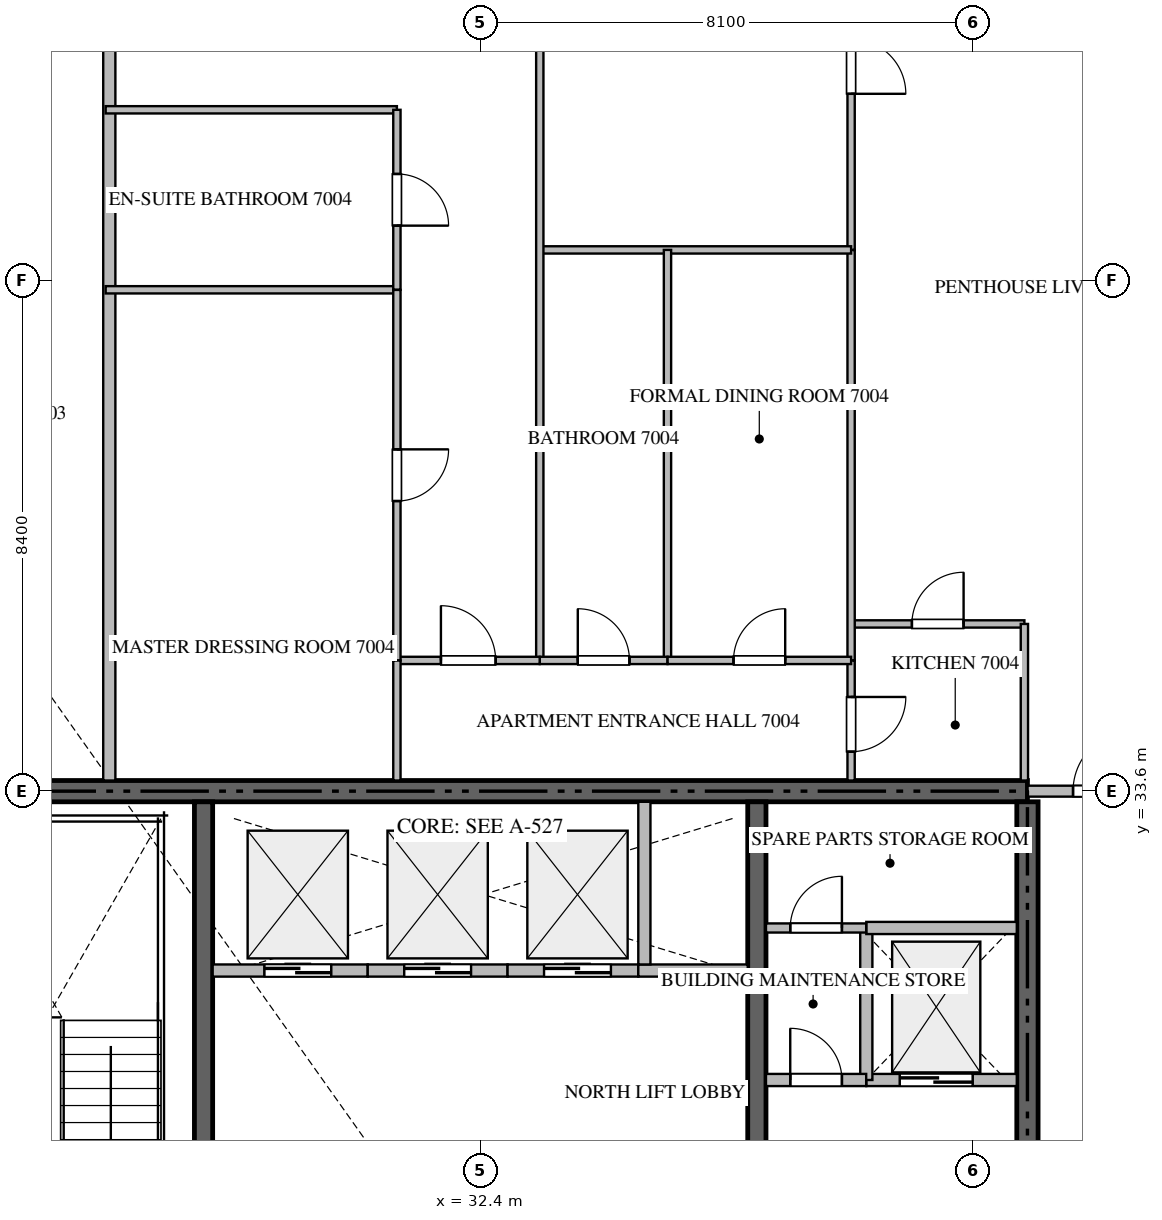
"""IFC4 building model, lengths in metres.
Left out: names, types, materials, properties, quantities, classifications, styles, units other than length and angle.
Written with IfcOpenShell. Run it as: python <this file> out.ifc"""

import sys

from ifc_helpers import new_model, si_unit, direction, frame, frame_2d, origin, place, context, subcontext, project, spatial, rectangle, extrude, source, transform, mapped, element, fill, save


model = new_model("IFC4")
c1 = context("Model", 3, precision=1e-05, world=origin(), true_north=direction((0.0, 1.0)))
c2 = subcontext(c1, "Body", "Model", "MODEL_VIEW")
j1 = project(units=[si_unit("LENGTHUNIT", "METRE"), si_unit("PLANEANGLEUNIT", "RADIAN")], contexts=[c1])
p1 = place(None, origin())
s1 = spatial("IfcSite", under=j1, at=p1, CompositionType="ELEMENT")
p2 = place(p1, origin())
s2 = spatial("IfcBuilding", under=s1, at=p2, CompositionType="ELEMENT")
p3 = place(p2, frame((0.0, 0.0, 279.75)))
s3 = spatial("IfcBuildingStorey", under=s2, at=p3, CompositionType="ELEMENT", Elevation=279.75)
p4 = place(p3, frame((41.4, 33.6, -0.26), z_axis=(0.0, 0.0, 1.0), x_axis=(-1.0, 0.0, 0.0)))
e1 = element("IfcWall", 1, at=p4, inside=s3, PredefinedType="SHEAR", context=c2, shape_type="SweptSolid", body=[
    extrude(rectangle(XDim=18.0, YDim=0.35, at=frame_2d((9.0, 0.0))), origin(), (0.0, 0.0, 1.0), 3.848),
])
p5 = place(p3, frame((41.4, 27.75, -0.26), z_axis=(0.0, 0.0, 1.0), x_axis=(0.0, 1.0, 0.0)))
e2 = element("IfcWall", 2, at=p5, inside=s3, PredefinedType="SHEAR", context=c2, shape_type="SweptSolid", body=[
    extrude(rectangle(XDim=5.675, YDim=0.35, at=frame_2d((2.837, 0.0))), origin(), (0.0, 0.0, 1.0), 3.848),
])
p6 = place(p3, frame((27.85, 23.55, -0.26), z_axis=(0.0, 0.0, 1.0), x_axis=(0.0, 1.0, 0.0)))
e3 = element("IfcWall", 3, at=p6, inside=s3, PredefinedType="SHEAR", context=c2, shape_type="SweptSolid", body=[
    extrude(rectangle(XDim=9.875, YDim=0.3, at=frame_2d((4.938, 0.0))), origin(), (0.0, 0.0, 1.0), 3.848),
])
p7 = place(p3, frame((36.95, 27.05, -0.26), z_axis=(0.0, 0.0, 1.0), x_axis=(0.0, 1.0, 0.0)))
e4 = element("IfcWall", 4, at=p7, inside=s3, PredefinedType="SHEAR", context=c2, shape_type="SweptSolid", body=[
    extrude(rectangle(XDim=6.375, YDim=0.3, at=frame_2d((3.188, 0.0))), origin(), (0.0, 0.0, 1.0), 3.848),
])
p8 = place(p3, frame((38.75, 28.85, 0.0), z_axis=(0.0, 0.0, 1.0), x_axis=(1.0, 0.0, 0.0)))
e5 = element("IfcWall", 5, at=p8, inside=s3, PredefinedType="STANDARD", context=c2, shape_type="SweptSolid", body=[
    extrude(rectangle(XDim=2.475, YDim=0.2, at=frame_2d((1.238, 0.0))), origin(), (0.0, 0.0, 1.0), 3.59),
])
p9 = place(p8, frame((0.55, 0.0, 0.0)))
e6 = element("IfcOpeningElement", 6, at=p9, cuts=e5, PredefinedType="OPENING", context=c2, shape_type="SweptSolid", body=[
    extrude(rectangle(XDim=1.2, YDim=2.2, at=frame_2d((0.6, 1.1))), frame((0.0, 0.11, 0.0), z_axis=(0.0, -1.0, 0.0), x_axis=(1.0, 0.0, 0.0)), (0.0, 0.0, 1.0), 0.22),
])
p10 = place(p3, frame((28.0, 30.65, 0.0), z_axis=(0.0, 0.0, 1.0), x_axis=(1.0, 0.0, 0.0)))
e7 = element("IfcWall", 7, at=p10, inside=s3, PredefinedType="STANDARD", context=c2, shape_type="SweptSolid", body=[
    extrude(rectangle(XDim=2.55, YDim=0.2, at=frame_2d((1.275, 0.0))), origin(), (0.0, 0.0, 1.0), 3.59),
])
p11 = place(p10, frame((0.85, 0.0, 0.0)))
e8 = element("IfcOpeningElement", 8, at=p11, cuts=e7, PredefinedType="OPENING", context=c2, shape_type="SweptSolid", body=[
    extrude(rectangle(XDim=1.1, YDim=2.2, at=frame_2d((0.55, 1.1))), frame((0.0, 0.11, 0.0), z_axis=(0.0, -1.0, 0.0), x_axis=(1.0, 0.0, 0.0)), (0.0, 0.0, 1.0), 0.22),
])
p12 = place(p3, frame((30.55, 30.65, 0.0), z_axis=(0.0, 0.0, 1.0), x_axis=(1.0, 0.0, 0.0)))
e9 = element("IfcWall", 9, at=p12, inside=s3, PredefinedType="STANDARD", context=c2, shape_type="SweptSolid", body=[
    extrude(rectangle(XDim=2.3, YDim=0.2, at=frame_2d((1.15, 0.0))), origin(), (0.0, 0.0, 1.0), 3.59),
])
p13 = place(p12, frame((0.6, 0.0, 0.0)))
e10 = element("IfcOpeningElement", 10, at=p13, cuts=e9, PredefinedType="OPENING", context=c2, shape_type="SweptSolid", body=[
    extrude(rectangle(XDim=1.1, YDim=2.2, at=frame_2d((0.55, 1.1))), frame((0.0, 0.11, 0.0), z_axis=(0.0, -1.0, 0.0), x_axis=(1.0, 0.0, 0.0)), (0.0, 0.0, 1.0), 0.22),
])
p14 = place(p3, frame((32.85, 30.65, 0.0), z_axis=(0.0, 0.0, 1.0), x_axis=(1.0, 0.0, 0.0)))
e11 = element("IfcWall", 11, at=p14, inside=s3, PredefinedType="STANDARD", context=c2, shape_type="SweptSolid", body=[
    extrude(rectangle(XDim=2.15, YDim=0.2, at=frame_2d((1.075, 0.0))), origin(), (0.0, 0.0, 1.0), 3.59),
])
p15 = place(p14, frame((0.6, 0.0, 0.0)))
e12 = element("IfcOpeningElement", 12, at=p15, cuts=e11, PredefinedType="OPENING", context=c2, shape_type="SweptSolid", body=[
    extrude(rectangle(XDim=1.1, YDim=2.2, at=frame_2d((0.55, 1.1))), frame((0.0, 0.11, 0.0), z_axis=(0.0, -1.0, 0.0), x_axis=(1.0, 0.0, 0.0)), (0.0, 0.0, 1.0), 0.22),
])
p16 = place(p3, frame((35.0, 30.65, 0.0), z_axis=(0.0, 0.0, 1.0), x_axis=(1.0, 0.0, 0.0)))
e13 = element("IfcWall", 13, at=p16, inside=s3, PredefinedType="STANDARD", context=c2, shape_type="SweptSolid", body=[
    extrude(rectangle(XDim=1.8, YDim=0.2, at=frame_2d((0.9, 0.0))), origin(), (0.0, 0.0, 1.0), 3.59),
])
p17 = place(p3, frame((35.1, 30.75, 0.0), z_axis=(0.0, 0.0, 1.0), x_axis=(0.0, 1.0, 0.0)))
e14 = element("IfcWall", 14, at=p17, inside=s3, PredefinedType="STANDARD", context=c2, shape_type="SweptSolid", body=[
    extrude(rectangle(XDim=2.675, YDim=0.2, at=frame_2d((1.337, 0.0))), origin(), (0.0, 0.0, 1.0), 3.59),
])
p18 = place(p3, frame((38.75, 28.85, 0.0), z_axis=(0.0, 0.0, 1.0), x_axis=(0.0, 1.0, 0.0)))
e15 = element("IfcWall", 15, at=p18, inside=s3, PredefinedType="STANDARD", context=c2, shape_type="SweptSolid", body=[
    extrude(rectangle(XDim=2.5, YDim=0.2, at=frame_2d((1.25, 0.0))), origin(), (0.0, 0.0, 1.0), 3.59),
])
p19 = place(p3, frame((38.75, 31.35, 0.0), z_axis=(0.0, 0.0, 1.0), x_axis=(1.0, 0.0, 0.0)))
e16 = element("IfcWall", 16, at=p19, inside=s3, PredefinedType="STANDARD", context=c2, shape_type="SweptSolid", body=[
    extrude(rectangle(XDim=2.475, YDim=0.2, at=frame_2d((1.238, 0.0))), origin(), (0.0, 0.0, 1.0), 3.59),
])
p20 = place(p3, frame((37.1, 28.85, 0.0), z_axis=(0.0, 0.0, 1.0), x_axis=(1.0, 0.0, 0.0)))
e17 = element("IfcWall", 17, at=p20, inside=s3, PredefinedType="STANDARD", context=c2, shape_type="SweptSolid", body=[
    extrude(rectangle(XDim=1.648, YDim=0.2, at=frame_2d((0.824, 0.0))), origin(), (0.0, 0.0, 1.0), 3.59),
])
p21 = place(p20, frame((0.399, 0.0, 0.0)))
e18 = element("IfcOpeningElement", 18, at=p21, cuts=e17, PredefinedType="OPENING", context=c2, shape_type="SweptSolid", body=[
    extrude(rectangle(XDim=0.85, YDim=2.1, at=frame_2d((0.425, 1.05))), frame((0.0, 0.11, 0.0), z_axis=(0.0, -1.0, 0.0), x_axis=(1.0, 0.0, 0.0)), (0.0, 0.0, 1.0), 0.22),
])
p22 = place(p3, frame((37.1, 31.35, 0.0), z_axis=(0.0, 0.0, 1.0), x_axis=(1.0, 0.0, 0.0)))
e19 = element("IfcWall", 19, at=p22, inside=s3, PredefinedType="PARTITIONING", context=c2, shape_type="SweptSolid", body=[
    extrude(rectangle(XDim=1.648, YDim=0.15, at=frame_2d((0.824, 0.0))), origin(), (0.0, 0.0, 1.0), 3.59),
])
p23 = place(p22, frame((0.399, 0.0, 0.0)))
e20 = element("IfcOpeningElement", 20, at=p23, cuts=e19, PredefinedType="OPENING", context=c2, shape_type="SweptSolid", body=[
    extrude(rectangle(XDim=0.85, YDim=2.1, at=frame_2d((0.425, 1.05))), frame((0.0, 0.085, 0.0), z_axis=(0.0, -1.0, 0.0), x_axis=(1.0, 0.0, 0.0)), (0.0, 0.0, 1.0), 0.17),
])
p24 = place(p3, frame((26.3, 33.775, 0.0), z_axis=(0.0, 0.0, 1.0), x_axis=(0.0, 1.0, 0.0)))
e21 = element("IfcWall", 21, at=p24, inside=s3, PredefinedType="PARTITIONING", context=c2, shape_type="SweptSolid", body=[
    extrude(rectangle(XDim=15.343, YDim=0.2, at=frame_2d((7.671, 0.0))), origin(), (0.0, 0.0, 1.0), 3.59),
])
p25 = place(p3, frame((41.402, 33.6, 0.0), z_axis=(0.0, 0.0, 1.0), x_axis=(1.0, 0.0, 0.0)))
e22 = element("IfcWall", 22, at=p25, inside=s3, PredefinedType="PARTITIONING", context=c2, shape_type="SweptSolid", body=[
    extrude(rectangle(XDim=2.496, YDim=0.18, at=frame_2d((1.248, 0.0))), origin(), (0.0, 0.0, 1.0), 3.59),
])
p26 = place(p25, frame((0.748, 0.0, 0.0)))
e23 = element("IfcOpeningElement", 23, at=p26, cuts=e22, PredefinedType="OPENING", context=c2, shape_type="SweptSolid", body=[
    extrude(rectangle(XDim=1.0, YDim=2.15, at=frame_2d((0.5, 1.075))), frame((0.0, 0.1, 0.0), z_axis=(0.0, -1.0, 0.0), x_axis=(1.0, 0.0, 0.0)), (0.0, 0.0, 1.0), 0.2),
])
p27 = place(p3, frame((38.5, 36.35, 0.0), z_axis=(0.0, 0.0, 1.0), x_axis=(1.0, 0.0, 0.0)))
e24 = element("IfcWall", 24, at=p27, inside=s3, PredefinedType="PARTITIONING", context=c2, shape_type="SweptSolid", body=[
    extrude(rectangle(XDim=2.85, YDim=0.12, at=frame_2d((1.425, 0.0))), origin(), (0.0, 0.0, 1.0), 3.59),
])
p28 = place(p27, frame((1.0, 0.0, 0.0)))
e25 = element("IfcOpeningElement", 25, at=p28, cuts=e24, PredefinedType="OPENING", context=c2, shape_type="SweptSolid", body=[
    extrude(rectangle(XDim=0.85, YDim=2.1, at=frame_2d((0.425, 1.05))), frame((0.0, 0.07, 0.0), z_axis=(0.0, -1.0, 0.0), x_axis=(1.0, 0.0, 0.0)), (0.0, 0.0, 1.0), 0.14),
])
p29 = place(p3, frame((41.35, 36.35, 0.0), z_axis=(0.0, 0.0, 1.0), x_axis=(0.0, -1.0, 0.0)))
e26 = element("IfcWall", 26, at=p29, inside=s3, PredefinedType="PARTITIONING", context=c2, shape_type="SweptSolid", body=[
    extrude(rectangle(XDim=2.575, YDim=0.12, at=frame_2d((1.288, 0.0))), origin(), (0.0, 0.0, 1.0), 3.59),
])
p30 = place(p3, frame((38.5, 35.75, 0.0), z_axis=(0.0, 0.0, 1.0), x_axis=(0.0, -1.0, 0.0)))
e27 = element("IfcWall", 27, at=p30, inside=s3, PredefinedType="PARTITIONING", context=c2, shape_type="SweptSolid", body=[
    extrude(rectangle(XDim=1.975, YDim=0.12, at=frame_2d((0.988, 0.0))), origin(), (0.0, 0.0, 1.0), 3.59),
])
p31 = place(p30, frame((0.601, 0.0, 0.0)))
e28 = element("IfcOpeningElement", 28, at=p31, cuts=e27, PredefinedType="OPENING", context=c2, shape_type="SweptSolid", body=[
    extrude(rectangle(XDim=0.9, YDim=2.1, at=frame_2d((0.45, 1.05))), frame((0.0, 0.07, 0.0), z_axis=(0.0, -1.0, 0.0), x_axis=(1.0, 0.0, 0.0)), (0.0, 0.0, 1.0), 0.14),
])
p32 = place(p3, frame((38.5, 49.105, 0.0), z_axis=(0.0, 0.0, 1.0), x_axis=(0.0, -1.0, 0.0)))
e29 = element("IfcWall", 29, at=p32, inside=s3, PredefinedType="PARTITIONING", context=c2, shape_type="SweptSolid", body=[
    extrude(rectangle(XDim=6.604, YDim=0.12, at=frame_2d((3.302, 0.0))), origin(), (0.0, 0.0, 1.0), 3.59),
])
p33 = place(p32, frame((3.137, 0.0, 0.0)))
e30 = element("IfcOpeningElement", 30, at=p33, cuts=e29, PredefinedType="OPENING", context=c2, shape_type="SweptSolid", body=[
    extrude(rectangle(XDim=0.9, YDim=2.1, at=frame_2d((0.45, 1.05))), frame((0.0, 0.07, 0.0), z_axis=(0.0, -1.0, 0.0), x_axis=(1.0, 0.0, 0.0)), (0.0, 0.0, 1.0), 0.14),
])
p34 = place(p3, frame((38.5, 42.499, 0.0), z_axis=(0.0, 0.0, 1.0), x_axis=(0.0, -1.0, 0.0)))
e31 = element("IfcWall", 31, at=p34, inside=s3, PredefinedType="PARTITIONING", context=c2, shape_type="SweptSolid", body=[
    extrude(rectangle(XDim=6.747, YDim=0.12, at=frame_2d((3.374, 0.0))), origin(), (0.0, 0.0, 1.0), 3.59),
])
p35 = place(p3, frame((33.38, 42.501, 0.0), z_axis=(0.0, 0.0, 1.0), x_axis=(1.0, 0.0, 0.0)))
e32 = element("IfcWall", 32, at=p35, inside=s3, PredefinedType="PARTITIONING", context=c2, shape_type="SweptSolid", body=[
    extrude(rectangle(XDim=5.12, YDim=0.12, at=frame_2d((2.56, 0.0))), origin(), (0.0, 0.0, 1.0), 3.59),
])
p36 = place(p3, frame((33.38, 49.105, 0.0), z_axis=(0.0, 0.0, 1.0), x_axis=(0.0, -1.0, 0.0)))
e33 = element("IfcWall", 33, at=p36, inside=s3, PredefinedType="PARTITIONING", context=c2, shape_type="SweptSolid", body=[
    extrude(rectangle(XDim=13.355, YDim=0.12, at=frame_2d((6.677, 0.0))), origin(), (0.0, 0.0, 1.0), 3.59),
])
p37 = place(p3, frame((35.48, 42.501, 0.0), z_axis=(0.0, 0.0, 1.0), x_axis=(0.0, -1.0, 0.0)))
e34 = element("IfcWall", 34, at=p37, inside=s3, PredefinedType="PARTITIONING", context=c2, shape_type="SweptSolid", body=[
    extrude(rectangle(XDim=6.751, YDim=0.12, at=frame_2d((3.375, 0.0))), origin(), (0.0, 0.0, 1.0), 3.59),
])
p38 = place(p3, frame((33.38, 35.75, 0.0), z_axis=(0.0, 0.0, 1.0), x_axis=(1.0, 0.0, 0.0)))
e35 = element("IfcWall", 35, at=p38, inside=s3, PredefinedType="PARTITIONING", context=c2, shape_type="SweptSolid", body=[
    extrude(rectangle(XDim=2.1, YDim=0.12, at=frame_2d((1.05, 0.0))), origin(), (0.0, 0.0, 1.0), 3.59),
])
p39 = place(p38, frame((0.625, 0.0, 0.0)))
e36 = element("IfcOpeningElement", 36, at=p39, cuts=e35, PredefinedType="OPENING", context=c2, shape_type="SweptSolid", body=[
    extrude(rectangle(XDim=0.85, YDim=2.1, at=frame_2d((0.425, 1.05))), frame((0.0, 0.07, 0.0), z_axis=(0.0, -1.0, 0.0), x_axis=(1.0, 0.0, 0.0)), (0.0, 0.0, 1.0), 0.14),
])
p40 = place(p3, frame((35.482, 35.75, 0.0), z_axis=(0.0, 0.0, 1.0), x_axis=(1.0, 0.0, 0.0)))
e37 = element("IfcWall", 37, at=p40, inside=s3, PredefinedType="PARTITIONING", context=c2, shape_type="SweptSolid", body=[
    extrude(rectangle(XDim=3.018, YDim=0.12, at=frame_2d((1.509, 0.0))), origin(), (0.0, 0.0, 1.0), 3.59),
])
p41 = place(p40, frame((1.084, 0.0, 0.0)))
e38 = element("IfcOpeningElement", 38, at=p41, cuts=e37, PredefinedType="OPENING", context=c2, shape_type="SweptSolid", body=[
    extrude(rectangle(XDim=0.85, YDim=2.1, at=frame_2d((0.425, 1.05))), frame((0.0, 0.07, 0.0), z_axis=(0.0, -1.0, 0.0), x_axis=(1.0, 0.0, 0.0)), (0.0, 0.0, 1.0), 0.14),
])
p42 = place(p3, frame((31.03, 35.75, 0.0), z_axis=(0.0, 0.0, 1.0), x_axis=(1.0, 0.0, 0.0)))
e39 = element("IfcWall", 39, at=p42, inside=s3, PredefinedType="PARTITIONING", context=c2, shape_type="SweptSolid", body=[
    extrude(rectangle(XDim=2.348, YDim=0.12, at=frame_2d((1.174, 0.0))), origin(), (0.0, 0.0, 1.0), 3.59),
])
p43 = place(p42, frame((0.724, 0.0, 0.0)))
e40 = element("IfcOpeningElement", 40, at=p43, cuts=e39, PredefinedType="OPENING", context=c2, shape_type="SweptSolid", body=[
    extrude(rectangle(XDim=0.9, YDim=2.1, at=frame_2d((0.45, 1.05))), frame((0.0, 0.07, 0.0), z_axis=(0.0, -1.0, 0.0), x_axis=(1.0, 0.0, 0.0)), (0.0, 0.0, 1.0), 0.14),
])
for number, where, z_axis, x_axis in (
    (41, (26.24, 44.805, 0.0), (0.0, 0.0, 1.0), (1.0, 0.0, 0.0)),
    (42, (26.24, 41.845, 0.0), (0.0, 0.0, 1.0), (1.0, 0.0, 0.0)),
):
    element("IfcWall", number, at=place(p3, frame(where, z_axis=z_axis, x_axis=x_axis)), inside=s3, PredefinedType="PARTITIONING", context=c2, shape_type="SweptSolid", body=[
        extrude(rectangle(XDim=4.79, YDim=0.12, at=frame_2d((2.395, 0.0))), origin(), (0.0, 0.0, 1.0), 3.59),
    ])
p44 = place(p3, frame((31.03, 44.805, 0.0), z_axis=(0.0, 0.0, 1.0), x_axis=(0.0, -1.0, 0.0)))
e43 = element("IfcWall", 43, at=p44, inside=s3, PredefinedType="PARTITIONING", context=c2, shape_type="SweptSolid", body=[
    extrude(rectangle(XDim=2.96, YDim=0.12, at=frame_2d((1.48, 0.0))), origin(), (0.0, 0.0, 1.0), 3.59),
])
p45 = place(p44, frame((1.055, 0.0, 0.0)))
e44 = element("IfcOpeningElement", 44, at=p45, cuts=e43, PredefinedType="OPENING", context=c2, shape_type="SweptSolid", body=[
    extrude(rectangle(XDim=0.85, YDim=2.1, at=frame_2d((0.425, 1.05))), frame((0.0, 0.07, 0.0), z_axis=(0.0, -1.0, 0.0), x_axis=(1.0, 0.0, 0.0)), (0.0, 0.0, 1.0), 0.14),
])
p46 = place(p3, frame((31.03, 41.843, 0.0), z_axis=(0.0, 0.0, 1.0), x_axis=(0.0, -1.0, 0.0)))
e45 = element("IfcWall", 45, at=p46, inside=s3, PredefinedType="PARTITIONING", context=c2, shape_type="SweptSolid", body=[
    extrude(rectangle(XDim=6.093, YDim=0.12, at=frame_2d((3.046, 0.0))), origin(), (0.0, 0.0, 1.0), 3.59),
])
p47 = place(p46, frame((2.622, 0.0, 0.0)))
e46 = element("IfcOpeningElement", 46, at=p47, cuts=e45, PredefinedType="OPENING", context=c2, shape_type="SweptSolid", body=[
    extrude(rectangle(XDim=0.85, YDim=2.1, at=frame_2d((0.425, 1.05))), frame((0.0, 0.07, 0.0), z_axis=(0.0, -1.0, 0.0), x_axis=(1.0, 0.0, 0.0)), (0.0, 0.0, 1.0), 0.14),
])
p48 = place(p3, frame((31.03, 35.748, 0.0), z_axis=(0.0, 0.0, 1.0), x_axis=(0.0, -1.0, 0.0)))
e47 = element("IfcWall", 47, at=p48, inside=s3, PredefinedType="PARTITIONING", context=c2, shape_type="SweptSolid", body=[
    extrude(rectangle(XDim=1.973, YDim=0.12, at=frame_2d((0.987, 0.0))), origin(), (0.0, 0.0, 1.0), 3.59),
])
m1 = source(origin(), c2, "Body", "SweptSolid", [
    extrude(rectangle(XDim=1.2, YDim=2.2, at=frame_2d((0.6, 1.1))), frame((0.0, 0.025, 0.0), z_axis=(0.0, -1.0, 0.0), x_axis=(1.0, 0.0, 0.0)), (0.0, 0.0, 1.0), 0.05),
])
p49 = place(p9, origin())
e48 = element("IfcDoor", 48, at=p49, inside=s3, OperationType="DOUBLE_DOOR_SLIDING", PredefinedType="DOOR", context=c2, shape_type="MappedRepresentation", body=[
    mapped(m1, transform((0.0, 0.0, 0.0), scale=1.0)),
])
fill(e6, e48)
m2 = source(origin(), c2, "Body", "SweptSolid", [
    extrude(rectangle(XDim=1.1, YDim=2.2, at=frame_2d((0.55, 1.1))), frame((0.0, 0.025, 0.0), z_axis=(0.0, -1.0, 0.0), x_axis=(1.0, 0.0, 0.0)), (0.0, 0.0, 1.0), 0.05),
])
p50 = place(p11, origin())
e49 = element("IfcDoor", 49, at=p50, inside=s3, OperationType="DOUBLE_DOOR_SLIDING", PredefinedType="DOOR", context=c2, shape_type="MappedRepresentation", body=[
    mapped(m2, transform((0.0, 0.0, 0.0), scale=1.0)),
])
fill(e8, e49)
p51 = place(p13, origin())
e50 = element("IfcDoor", 50, at=p51, inside=s3, OperationType="DOUBLE_DOOR_SLIDING", PredefinedType="DOOR", context=c2, shape_type="MappedRepresentation", body=[
    mapped(m2, transform((0.0, 0.0, 0.0), scale=1.0)),
])
fill(e10, e50)
p52 = place(p15, origin())
e51 = element("IfcDoor", 51, at=p52, inside=s3, OperationType="DOUBLE_DOOR_SLIDING", PredefinedType="DOOR", context=c2, shape_type="MappedRepresentation", body=[
    mapped(m2, transform((0.0, 0.0, 0.0), scale=1.0)),
])
fill(e12, e51)
m3 = source(origin(), c2, "Body", "SweptSolid", [
    extrude(rectangle(XDim=0.85, YDim=2.1, at=frame_2d((0.425, 1.05))), frame((0.0, 0.025, 0.0), z_axis=(0.0, -1.0, 0.0), x_axis=(1.0, 0.0, 0.0)), (0.0, 0.0, 1.0), 0.05),
])
p53 = place(p21, origin())
e52 = element("IfcDoor", 52, at=p53, inside=s3, OperationType="SINGLE_SWING_LEFT", PredefinedType="DOOR", context=c2, shape_type="MappedRepresentation", body=[
    mapped(m3, transform((0.0, 0.0, 0.0), scale=1.0)),
])
fill(e18, e52)
p54 = place(p23, origin())
e53 = element("IfcDoor", 53, at=p54, inside=s3, OperationType="SINGLE_SWING_RIGHT", PredefinedType="DOOR", context=c2, shape_type="MappedRepresentation", body=[
    mapped(m3, transform((0.0, 0.0, 0.0), scale=1.0)),
])
fill(e20, e53)
m4 = source(origin(), c2, "Body", "SweptSolid", [
    extrude(rectangle(XDim=1.0, YDim=2.15, at=frame_2d((0.5, 1.075))), frame((0.0, 0.025, 0.0), z_axis=(0.0, -1.0, 0.0), x_axis=(1.0, 0.0, 0.0)), (0.0, 0.0, 1.0), 0.05),
])
p55 = place(p26, origin())
e54 = element("IfcDoor", 54, at=p55, inside=s3, OperationType="SINGLE_SWING_RIGHT", PredefinedType="DOOR", context=c2, shape_type="MappedRepresentation", body=[
    mapped(m4, transform((0.0, 0.0, 0.0), scale=1.0)),
])
fill(e23, e54)
p56 = place(p28, origin())
e55 = element("IfcDoor", 55, at=p56, inside=s3, OperationType="SINGLE_SWING_RIGHT", PredefinedType="DOOR", context=c2, shape_type="MappedRepresentation", body=[
    mapped(m3, transform((0.0, 0.0, 0.0), scale=1.0)),
])
fill(e25, e55)
m5 = source(origin(), c2, "Body", "SweptSolid", [
    extrude(rectangle(XDim=0.9, YDim=2.1, at=frame_2d((0.45, 1.05))), frame((0.0, 0.025, 0.0), z_axis=(0.0, -1.0, 0.0), x_axis=(1.0, 0.0, 0.0)), (0.0, 0.0, 1.0), 0.05),
])
p57 = place(p31, origin())
e56 = element("IfcDoor", 56, at=p57, inside=s3, OperationType="SINGLE_SWING_LEFT", PredefinedType="DOOR", context=c2, shape_type="MappedRepresentation", body=[
    mapped(m5, transform((0.0, 0.0, 0.0), scale=1.0)),
])
fill(e28, e56)
p58 = place(p33, origin())
e57 = element("IfcDoor", 57, at=p58, inside=s3, OperationType="SINGLE_SWING_RIGHT", PredefinedType="DOOR", context=c2, shape_type="MappedRepresentation", body=[
    mapped(m5, transform((0.0, 0.0, 0.0), scale=1.0)),
])
fill(e30, e57)
p59 = place(p39, origin())
e58 = element("IfcDoor", 58, at=p59, inside=s3, OperationType="SINGLE_SWING_LEFT", PredefinedType="DOOR", context=c2, shape_type="MappedRepresentation", body=[
    mapped(m3, transform((0.0, 0.0, 0.0), scale=1.0)),
])
fill(e36, e58)
p60 = place(p41, origin())
e59 = element("IfcDoor", 59, at=p60, inside=s3, OperationType="SINGLE_SWING_RIGHT", PredefinedType="DOOR", context=c2, shape_type="MappedRepresentation", body=[
    mapped(m3, transform((0.0, 0.0, 0.0), scale=1.0)),
])
fill(e38, e59)
p61 = place(p43, origin())
e60 = element("IfcDoor", 60, at=p61, inside=s3, OperationType="SINGLE_SWING_LEFT", PredefinedType="DOOR", context=c2, shape_type="MappedRepresentation", body=[
    mapped(m5, transform((0.0, 0.0, 0.0), scale=1.0)),
])
fill(e40, e60)
p62 = place(p45, origin())
e61 = element("IfcDoor", 61, at=p62, inside=s3, OperationType="SINGLE_SWING_RIGHT", PredefinedType="DOOR", context=c2, shape_type="MappedRepresentation", body=[
    mapped(m3, transform((0.0, 0.0, 0.0), scale=1.0)),
])
fill(e44, e61)
p63 = place(p47, origin())
e62 = element("IfcDoor", 62, at=p63, inside=s3, OperationType="SINGLE_SWING_LEFT", PredefinedType="DOOR", context=c2, shape_type="MappedRepresentation", body=[
    mapped(m3, transform((0.0, 0.0, 0.0), scale=1.0)),
])
fill(e46, e62)
save(model, sys.argv[1])
